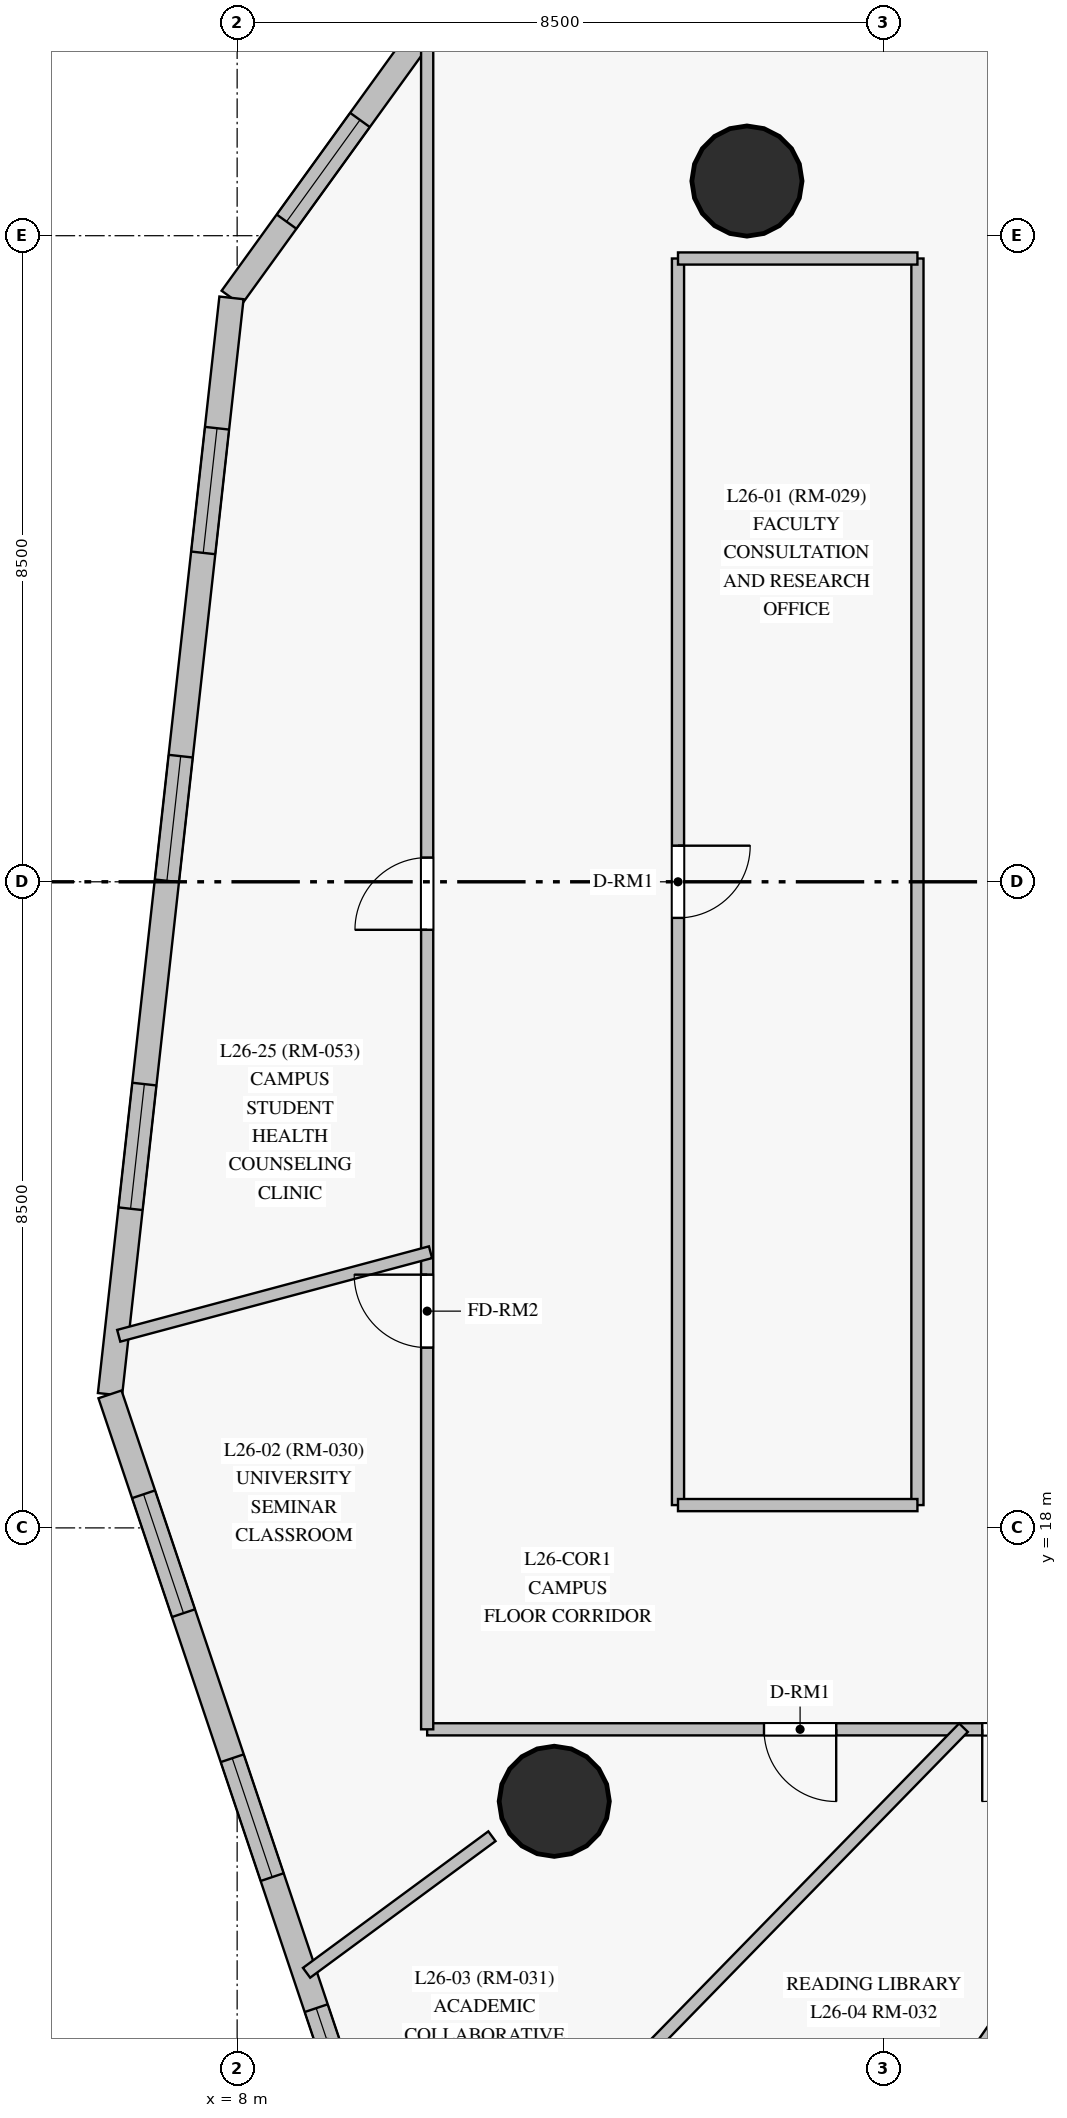
"""IFC4 building model, lengths in metres.
Left out: names, types, materials, properties, quantities, classifications, styles, units other than length and angle.
Written with IfcOpenShell. Run it as: python <this file> out.ifc"""

import sys

from ifc_helpers import new_model, si_unit, direction, frame, frame_2d, origin, origin_with_axes, origin_2d, place, context, subcontext, project, spatial, rectangle, circle, extrude, source, transform, mapped, element, fill, save


model = new_model("IFC4")
c1 = context("Model", 3, precision=1e-05, world=origin(), true_north=direction((0.0, 1.0)))
c2 = subcontext(c1, "Body", "Model", "MODEL_VIEW")
j1 = project(units=[si_unit("LENGTHUNIT", "METRE"), si_unit("PLANEANGLEUNIT", "RADIAN")], contexts=[c1])
p1 = place(None, origin())
s1 = spatial("IfcSite", under=j1, at=p1, CompositionType="ELEMENT")
p2 = place(p1, origin())
s2 = spatial("IfcBuilding", under=s1, at=p2, CompositionType="ELEMENT")
p3 = place(p2, frame((0.0, 0.0, 99.25)))
s3 = spatial("IfcBuildingStorey", under=s2, at=p3, CompositionType="ELEMENT", Elevation=99.25)
m1 = source(origin_with_axes(), c2, "Body", "SweptSolid", [
    extrude(circle(Radius=0.725, at=origin_2d()), origin(), (0.0, 0.0, 1.0), 3.05),
])
for number, where, z_axis, x_axis in (
    (1, (14.707, 35.719, 0.0), (0.0, 0.0, 1.0), (1.0, 0.0, 0.0)),
    (2, (12.172, 14.403, 0.0), (0.0, 0.0, 1.0), (1.0, 0.0, 0.0)),
):
    element("IfcColumn", number, at=place(p3, frame(where, z_axis=z_axis, x_axis=x_axis)), inside=s3, PredefinedType="COLUMN", context=c2, shape_type="MappedRepresentation", body=[
        mapped(m1, transform((0.0, 0.0, 0.0), scale=1.0)),
    ])
p4 = place(p3, frame((14.74, 43.617, 0.0), z_axis=(0.0, 0.0, 1.0), x_axis=(-0.585528081862, -0.81065212351, 0.0)))
e3 = element("IfcWall", 3, at=p4, inside=s3, PredefinedType="SOLIDWALL", context=c2, shape_type="SweptSolid", body=[
    extrude(rectangle(XDim=11.638, YDim=0.32, at=frame_2d((5.819, 0.0))), origin(), (0.0, 0.0, 1.0), 2.825),
])
p5 = place(p4, frame((2.799, 0.0, 0.85)))
e4 = element("IfcOpeningElement", 4, at=p5, cuts=e3, PredefinedType="OPENING", context=c2, shape_type="SweptSolid", body=[
    extrude(rectangle(XDim=1.65, YDim=1.65, at=frame_2d((0.825, 0.825))), frame((0.0, 0.17, 0.0), z_axis=(0.0, -1.0, 0.0), x_axis=(1.0, 0.0, 0.0)), (0.0, 0.0, 1.0), 0.34),
])
p6 = place(p4, frame((8.751, 0.0, 0.85)))
e5 = element("IfcOpeningElement", 5, at=p6, cuts=e3, PredefinedType="OPENING", context=c2, shape_type="SweptSolid", body=[
    extrude(rectangle(XDim=1.65, YDim=1.65, at=frame_2d((0.825, 0.825))), frame((0.0, 0.17, 0.0), z_axis=(0.0, -1.0, 0.0), x_axis=(1.0, 0.0, 0.0)), (0.0, 0.0, 1.0), 0.34),
])
p7 = place(p3, frame((7.926, 34.182, 0.0), z_axis=(0.0, 0.0, 1.0), x_axis=(-0.11012873841, -0.993917331057, 0.0)))
e6 = element("IfcWall", 6, at=p7, inside=s3, PredefinedType="SOLIDWALL", context=c2, shape_type="SweptSolid", body=[
    extrude(rectangle(XDim=14.514, YDim=0.32, at=frame_2d((7.257, 0.0))), origin(), (0.0, 0.0, 1.0), 2.825),
])
p8 = place(p7, frame((1.725, 0.0, 0.85)))
e7 = element("IfcOpeningElement", 7, at=p8, cuts=e6, PredefinedType="OPENING", context=c2, shape_type="SweptSolid", body=[
    extrude(rectangle(XDim=1.65, YDim=1.65, at=frame_2d((0.825, 0.825))), frame((0.0, 0.17, 0.0), z_axis=(0.0, -1.0, 0.0), x_axis=(1.0, 0.0, 0.0)), (0.0, 0.0, 1.0), 0.34),
])
p9 = place(p7, frame((6.066, 0.0, 0.85)))
e8 = element("IfcOpeningElement", 8, at=p9, cuts=e6, PredefinedType="OPENING", context=c2, shape_type="SweptSolid", body=[
    extrude(rectangle(XDim=1.65, YDim=1.65, at=frame_2d((0.825, 0.825))), frame((0.0, 0.17, 0.0), z_axis=(0.0, -1.0, 0.0), x_axis=(1.0, 0.0, 0.0)), (0.0, 0.0, 1.0), 0.34),
])
p10 = place(p7, frame((10.407, 0.0, 0.85)))
e9 = element("IfcOpeningElement", 9, at=p10, cuts=e6, PredefinedType="OPENING", context=c2, shape_type="SweptSolid", body=[
    extrude(rectangle(XDim=1.65, YDim=1.65, at=frame_2d((0.825, 0.825))), frame((0.0, 0.17, 0.0), z_axis=(0.0, -1.0, 0.0), x_axis=(1.0, 0.0, 0.0)), (0.0, 0.0, 1.0), 0.34),
])
p11 = place(p3, frame((6.327, 19.757, 0.0), z_axis=(0.0, 0.0, 1.0), x_axis=(0.318478051642, -0.947930235103, 0.0)))
e10 = element("IfcWall", 10, at=p11, inside=s3, PredefinedType="SOLIDWALL", context=c2, shape_type="SweptSolid", body=[
    extrude(rectangle(XDim=10.021, YDim=0.32, at=frame_2d((5.01, 0.0))), origin(), (0.0, 0.0, 1.0), 2.825),
])
p12 = place(p11, frame((1.387, 0.0, 0.85)))
e11 = element("IfcOpeningElement", 11, at=p12, cuts=e10, PredefinedType="OPENING", context=c2, shape_type="SweptSolid", body=[
    extrude(rectangle(XDim=1.65, YDim=1.65, at=frame_2d((0.825, 0.825))), frame((0.0, 0.17, 0.0), z_axis=(0.0, -1.0, 0.0), x_axis=(1.0, 0.0, 0.0)), (0.0, 0.0, 1.0), 0.34),
])
p13 = place(p11, frame((5.05, 0.0, 0.85)))
e12 = element("IfcOpeningElement", 12, at=p13, cuts=e10, PredefinedType="OPENING", context=c2, shape_type="SweptSolid", body=[
    extrude(rectangle(XDim=1.65, YDim=1.65, at=frame_2d((0.825, 0.825))), frame((0.0, 0.17, 0.0), z_axis=(0.0, -1.0, 0.0), x_axis=(1.0, 0.0, 0.0)), (0.0, 0.0, 1.0), 0.34),
])
p14 = place(p11, frame((8.519, 0.0, 0.85)))
e13 = element("IfcOpeningElement", 13, at=p14, cuts=e10, PredefinedType="OPENING", context=c2, shape_type="SweptSolid", body=[
    extrude(rectangle(XDim=0.95, YDim=1.5, at=frame_2d((0.475, 0.75))), frame((0.0, 0.17, 0.0), z_axis=(0.0, -1.0, 0.0), x_axis=(1.0, 0.0, 0.0)), (0.0, 0.0, 1.0), 0.34),
])
p15 = place(p3, frame((40.25, 15.35, 0.0), z_axis=(0.0, 0.0, 1.0), x_axis=(-1.0, 0.0, 0.0)))
e14 = element("IfcWall", 14, at=p15, inside=s3, PredefinedType="PARTITIONING", context=c2, shape_type="SweptSolid", body=[
    extrude(rectangle(XDim=29.75, YDim=0.16, at=frame_2d((14.875, 0.0))), origin(), (0.0, 0.0, 1.0), 2.225),
])
p16 = place(p15, frame((24.369, 0.0, 0.0)))
e15 = element("IfcOpeningElement", 15, at=p16, cuts=e14, PredefinedType="OPENING", context=c2, shape_type="SweptSolid", body=[
    extrude(rectangle(XDim=0.95, YDim=2.15, at=frame_2d((0.475, 1.075))), frame((0.0, 0.09, 0.0), z_axis=(0.0, -1.0, 0.0), x_axis=(1.0, 0.0, 0.0)), (0.0, 0.0, 1.0), 0.18),
])
p17 = place(p15, frame((21.498, 0.0, 0.0)))
e16 = element("IfcOpeningElement", 16, at=p17, cuts=e14, PredefinedType="OPENING", context=c2, shape_type="SweptSolid", body=[
    extrude(rectangle(XDim=0.95, YDim=2.15, at=frame_2d((0.475, 1.075))), frame((0.0, 0.09, 0.0), z_axis=(0.0, -1.0, 0.0), x_axis=(1.0, 0.0, 0.0)), (0.0, 0.0, 1.0), 0.18),
])
p18 = place(p15, frame((18.373, 0.0, 0.0)))
e17 = element("IfcOpeningElement", 17, at=p18, cuts=e14, PredefinedType="OPENING", context=c2, shape_type="SweptSolid", body=[
    extrude(rectangle(XDim=0.95, YDim=2.15, at=frame_2d((0.475, 1.075))), frame((0.0, 0.09, 0.0), z_axis=(0.0, -1.0, 0.0), x_axis=(1.0, 0.0, 0.0)), (0.0, 0.0, 1.0), 0.18),
])
p19 = place(p15, frame((16.347, 0.0, 0.0)))
e18 = element("IfcOpeningElement", 18, at=p19, cuts=e14, PredefinedType="OPENING", context=c2, shape_type="SweptSolid", body=[
    extrude(rectangle(XDim=0.95, YDim=2.15, at=frame_2d((0.475, 1.075))), frame((0.0, 0.09, 0.0), z_axis=(0.0, -1.0, 0.0), x_axis=(1.0, 0.0, 0.0)), (0.0, 0.0, 1.0), 0.18),
])
p20 = place(p15, frame((14.4, 0.0, 0.0)))
e19 = element("IfcOpeningElement", 19, at=p20, cuts=e14, PredefinedType="OPENING", context=c2, shape_type="SweptSolid", body=[
    extrude(rectangle(XDim=0.95, YDim=2.15, at=frame_2d((0.475, 1.075))), frame((0.0, 0.09, 0.0), z_axis=(0.0, -1.0, 0.0), x_axis=(1.0, 0.0, 0.0)), (0.0, 0.0, 1.0), 0.18),
])
p21 = place(p15, frame((12.386, 0.0, 0.0)))
e20 = element("IfcOpeningElement", 20, at=p21, cuts=e14, PredefinedType="OPENING", context=c2, shape_type="SweptSolid", body=[
    extrude(rectangle(XDim=0.95, YDim=2.15, at=frame_2d((0.475, 1.075))), frame((0.0, 0.09, 0.0), z_axis=(0.0, -1.0, 0.0), x_axis=(1.0, 0.0, 0.0)), (0.0, 0.0, 1.0), 0.18),
])
p22 = place(p15, frame((9.938, 0.0, 0.0)))
e21 = element("IfcOpeningElement", 21, at=p22, cuts=e14, PredefinedType="OPENING", context=c2, shape_type="SweptSolid", body=[
    extrude(rectangle(XDim=0.95, YDim=2.15, at=frame_2d((0.475, 1.075))), frame((0.0, 0.09, 0.0), z_axis=(0.0, -1.0, 0.0), x_axis=(1.0, 0.0, 0.0)), (0.0, 0.0, 1.0), 0.18),
])
p23 = place(p15, frame((6.962, 0.0, 0.0)))
e22 = element("IfcOpeningElement", 22, at=p23, cuts=e14, PredefinedType="OPENING", context=c2, shape_type="SweptSolid", body=[
    extrude(rectangle(XDim=0.95, YDim=2.15, at=frame_2d((0.475, 1.075))), frame((0.0, 0.09, 0.0), z_axis=(0.0, -1.0, 0.0), x_axis=(1.0, 0.0, 0.0)), (0.0, 0.0, 1.0), 0.18),
])
p24 = place(p3, frame((10.5, 15.35, 0.0), z_axis=(0.0, 0.0, 1.0), x_axis=(0.0, 1.0, 0.0)))
e23 = element("IfcWall", 23, at=p24, inside=s3, PredefinedType="PARTITIONING", context=c2, shape_type="SweptSolid", body=[
    extrude(rectangle(XDim=22.138, YDim=0.16, at=frame_2d((11.069, 0.0))), origin(), (0.0, 0.0, 1.0), 2.825),
])
p25 = place(p24, frame((5.021, 0.0, 0.0)))
e24 = element("IfcOpeningElement", 24, at=p25, cuts=e23, PredefinedType="OPENING", context=c2, shape_type="SweptSolid", body=[
    extrude(rectangle(XDim=0.96, YDim=2.15, at=frame_2d((0.48, 1.075))), frame((0.0, 0.09, 0.0), z_axis=(0.0, -1.0, 0.0), x_axis=(1.0, 0.0, 0.0)), (0.0, 0.0, 1.0), 0.18),
])
p26 = place(p24, frame((10.518, 0.0, 0.0)))
e25 = element("IfcOpeningElement", 25, at=p26, cuts=e23, PredefinedType="OPENING", context=c2, shape_type="SweptSolid", body=[
    extrude(rectangle(XDim=0.95, YDim=2.15, at=frame_2d((0.475, 1.075))), frame((0.0, 0.09, 0.0), z_axis=(0.0, -1.0, 0.0), x_axis=(1.0, 0.0, 0.0)), (0.0, 0.0, 1.0), 0.18),
])
p27 = place(p3, frame((13.8, 34.7, 0.0), z_axis=(0.0, 0.0, 1.0), x_axis=(0.0, -1.0, 0.0)))
e26 = element("IfcWall", 26, at=p27, inside=s3, PredefinedType="PARTITIONING", context=c2, shape_type="SweptSolid", body=[
    extrude(rectangle(XDim=16.4, YDim=0.16, at=frame_2d((8.2, 0.0))), origin(), (0.0, 0.0, 1.0), 2.225),
])
p28 = place(p27, frame((7.725, 0.0, 0.0)))
e27 = element("IfcOpeningElement", 27, at=p28, cuts=e26, PredefinedType="OPENING", context=c2, shape_type="SweptSolid", body=[
    extrude(rectangle(XDim=0.95, YDim=2.15, at=frame_2d((0.475, 1.075))), frame((0.0, 0.09, 0.0), z_axis=(0.0, -1.0, 0.0), x_axis=(1.0, 0.0, 0.0)), (0.0, 0.0, 1.0), 0.18),
])
p29 = place(p3, frame((16.95, 18.3, 0.0), z_axis=(0.0, 0.0, 1.0), x_axis=(0.0, 1.0, 0.0)))
e28 = element("IfcWall", 28, at=p29, inside=s3, PredefinedType="PARTITIONING", context=c2, shape_type="SweptSolid", body=[
    extrude(rectangle(XDim=16.4, YDim=0.16, at=frame_2d((8.2, 0.0))), origin(), (0.0, 0.0, 1.0), 2.325),
])
p30 = place(p3, frame((22.46, 15.39, 0.0), z_axis=(0.0, 0.0, 1.0), x_axis=(-0.473459721756, -0.88081546982, 0.0)))
e29 = element("IfcWall", 29, at=p30, inside=s3, PredefinedType="PARTITIONING", context=c2, shape_type="SweptSolid", body=[
    extrude(rectangle(XDim=12.831, YDim=0.16, at=frame_2d((6.415, 0.0))), origin(), (0.0, 0.0, 1.0), 2.825),
])
p31 = place(p3, frame((17.556, 15.372, 0.0), z_axis=(0.0, 0.0, 1.0), x_axis=(-0.698423045648, -0.715685160743, 0.0)))
e30 = element("IfcWall", 30, at=p31, inside=s3, PredefinedType="PARTITIONING", context=c2, shape_type="SweptSolid", body=[
    extrude(rectangle(XDim=9.165, YDim=0.16, at=frame_2d((4.583, 0.0))), origin(), (0.0, 0.0, 1.0), 2.825),
])
p32 = place(p3, frame((20.703, 15.375, 0.0), z_axis=(0.0, 0.0, 1.0), x_axis=(-0.570299409109, -0.821436902002, 0.0)))
e31 = element("IfcWall", 31, at=p32, inside=s3, PredefinedType="PARTITIONING", context=c2, shape_type="SweptSolid", body=[
    extrude(rectangle(XDim=6.977, YDim=0.16, at=frame_2d((3.489, 0.0))), origin(), (0.0, 0.0, 1.0), 2.825),
])
p33 = place(p3, frame((6.442, 20.528, 0.0), z_axis=(0.0, 0.0, 1.0), x_axis=(0.965915454006, 0.258857751886, 0.0)))
e32 = element("IfcWall", 32, at=p33, inside=s3, PredefinedType="PARTITIONING", context=c2, shape_type="SweptSolid", body=[
    extrude(rectangle(XDim=4.246, YDim=0.16, at=frame_2d((2.123, 0.0))), origin(), (0.0, 0.0, 1.0), 2.825),
])
p34 = place(p3, frame((16.95, 34.7, 0.0), z_axis=(0.0, 0.0, 1.0), x_axis=(-1.0, 0.0, 0.0)))
e33 = element("IfcWall", 33, at=p34, inside=s3, PredefinedType="PARTITIONING", context=c2, shape_type="SweptSolid", body=[
    extrude(rectangle(XDim=3.15, YDim=0.16, at=frame_2d((1.575, 0.0))), origin(), (0.0, 0.0, 1.0), 2.225),
])
p35 = place(p3, frame((13.8, 18.3, 0.0), z_axis=(0.0, 0.0, 1.0), x_axis=(1.0, 0.0, 0.0)))
e34 = element("IfcWall", 34, at=p35, inside=s3, PredefinedType="PARTITIONING", context=c2, shape_type="SweptSolid", body=[
    extrude(rectangle(XDim=3.15, YDim=0.16, at=frame_2d((1.575, 0.0))), origin(), (0.0, 0.0, 1.0), 2.825),
])
p36 = place(p3, frame((11.352, 13.943, 0.0), z_axis=(0.0, 0.0, 1.0), x_axis=(-0.805183458548, -0.593025798832, 0.0)))
e35 = element("IfcWall", 35, at=p36, inside=s3, PredefinedType="PARTITIONING", context=c2, shape_type="SweptSolid", body=[
    extrude(rectangle(XDim=3.029, YDim=0.16, at=frame_2d((1.514, 0.0))), origin(), (0.0, 0.0, 1.0), 2.825),
])
m2 = source(origin_with_axes(), c2, "Body", "SweptSolid", [
    extrude(rectangle(XDim=1.65, YDim=1.65, at=frame_2d((0.825, 0.825))), frame((0.0, 0.03, 0.0), z_axis=(0.0, -1.0, 0.0), x_axis=(1.0, 0.0, 0.0)), (0.0, 0.0, 1.0), 0.06),
])
p37 = place(p6, origin())
e36 = element("IfcWindow", 36, at=p37, inside=s3, PartitioningType="SINGLE_PANEL", PredefinedType="WINDOW", context=c2, shape_type="MappedRepresentation", body=[
    mapped(m2, transform((0.0, 0.0, 0.0), scale=1.0)),
])
fill(e5, e36)
p38 = place(p8, origin())
e37 = element("IfcWindow", 37, at=p38, inside=s3, PartitioningType="SINGLE_PANEL", PredefinedType="WINDOW", context=c2, shape_type="MappedRepresentation", body=[
    mapped(m2, transform((0.0, 0.0, 0.0), scale=1.0)),
])
fill(e7, e37)
p39 = place(p9, origin())
e38 = element("IfcWindow", 38, at=p39, inside=s3, PartitioningType="SINGLE_PANEL", PredefinedType="WINDOW", context=c2, shape_type="MappedRepresentation", body=[
    mapped(m2, transform((0.0, 0.0, 0.0), scale=1.0)),
])
fill(e8, e38)
p40 = place(p10, origin())
e39 = element("IfcWindow", 39, at=p40, inside=s3, PartitioningType="SINGLE_PANEL", PredefinedType="WINDOW", context=c2, shape_type="MappedRepresentation", body=[
    mapped(m2, transform((0.0, 0.0, 0.0), scale=1.0)),
])
fill(e9, e39)
p41 = place(p12, origin())
e40 = element("IfcWindow", 40, at=p41, inside=s3, PartitioningType="SINGLE_PANEL", PredefinedType="WINDOW", context=c2, shape_type="MappedRepresentation", body=[
    mapped(m2, transform((0.0, 0.0, 0.0), scale=1.0)),
])
fill(e11, e40)
p42 = place(p13, origin())
e41 = element("IfcWindow", 41, at=p42, inside=s3, PartitioningType="SINGLE_PANEL", PredefinedType="WINDOW", context=c2, shape_type="MappedRepresentation", body=[
    mapped(m2, transform((0.0, 0.0, 0.0), scale=1.0)),
])
fill(e12, e41)
m3 = source(origin_with_axes(), c2, "Body", "SweptSolid", [
    extrude(rectangle(XDim=0.95, YDim=1.5, at=frame_2d((0.475, 0.75))), frame((0.0, 0.03, 0.0), z_axis=(0.0, -1.0, 0.0), x_axis=(1.0, 0.0, 0.0)), (0.0, 0.0, 1.0), 0.06),
])
p43 = place(p14, origin())
e42 = element("IfcWindow", 42, at=p43, inside=s3, PartitioningType="SINGLE_PANEL", PredefinedType="WINDOW", context=c2, shape_type="MappedRepresentation", body=[
    mapped(m3, transform((0.0, 0.0, 0.0), scale=1.0)),
])
fill(e13, e42)
m4 = source(origin_with_axes(), c2, "Body", "SweptSolid", [
    extrude(rectangle(XDim=0.95, YDim=2.15, at=frame_2d((0.475, 1.075))), frame((0.0, 0.025, 0.0), z_axis=(0.0, -1.0, 0.0), x_axis=(1.0, 0.0, 0.0)), (0.0, 0.0, 1.0), 0.05),
])
p44 = place(p28, origin())
e43 = element("IfcDoor", 43, at=p44, inside=s3, OperationType="SINGLE_SWING_LEFT", PredefinedType="DOOR", context=c2, shape_type="MappedRepresentation", body=[
    mapped(m4, transform((0.0, 0.0, 0.0), scale=1.0)),
])
fill(e27, e43)
m5 = source(origin_with_axes(), c2, "Body", "SweptSolid", [
    extrude(rectangle(XDim=0.96, YDim=2.15, at=frame_2d((0.48, 1.075))), frame((0.0, 0.025, 0.0), z_axis=(0.0, -1.0, 0.0), x_axis=(1.0, 0.0, 0.0)), (0.0, 0.0, 1.0), 0.05),
])
p45 = place(p25, origin())
e44 = element("IfcDoor", 44, at=p45, inside=s3, OperationType="SINGLE_SWING_RIGHT", PredefinedType="DOOR", context=c2, shape_type="MappedRepresentation", body=[
    mapped(m5, transform((0.0, 0.0, 0.0), scale=1.0)),
])
fill(e24, e44)
p46 = place(p16, origin())
e45 = element("IfcDoor", 45, at=p46, inside=s3, OperationType="SINGLE_SWING_LEFT", PredefinedType="DOOR", context=c2, shape_type="MappedRepresentation", body=[
    mapped(m4, transform((0.0, 0.0, 0.0), scale=1.0)),
])
fill(e15, e45)
p47 = place(p17, origin())
e46 = element("IfcDoor", 46, at=p47, inside=s3, OperationType="SINGLE_SWING_RIGHT", PredefinedType="DOOR", context=c2, shape_type="MappedRepresentation", body=[
    mapped(m4, transform((0.0, 0.0, 0.0), scale=1.0)),
])
fill(e16, e46)
p48 = place(p26, origin())
e47 = element("IfcDoor", 47, at=p48, inside=s3, OperationType="SINGLE_SWING_LEFT", PredefinedType="DOOR", context=c2, shape_type="MappedRepresentation", body=[
    mapped(m4, transform((0.0, 0.0, 0.0), scale=1.0)),
])
fill(e25, e47)
save(model, sys.argv[1])
